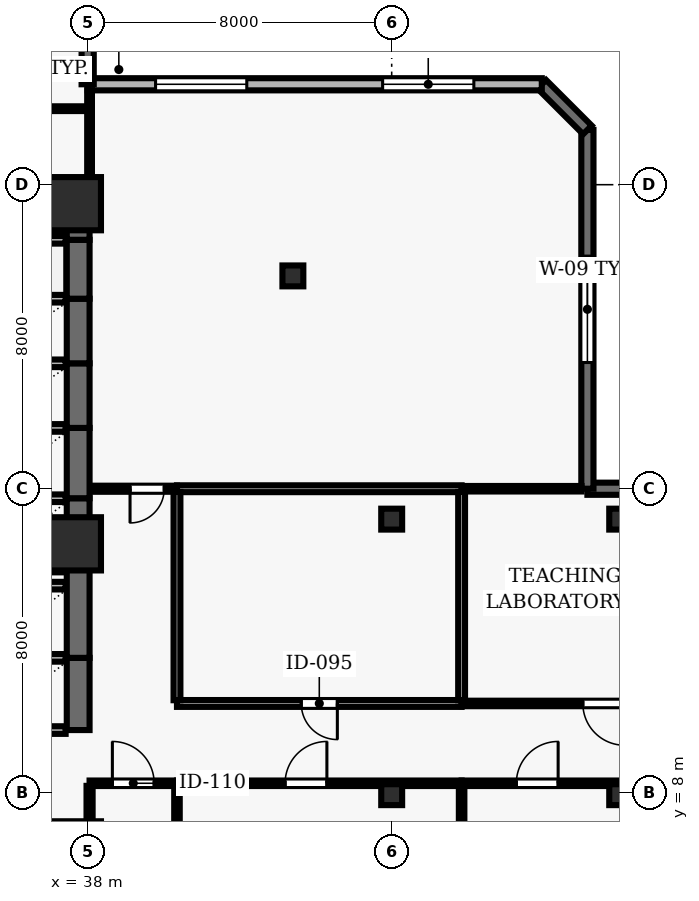
"""IFC4 building model, lengths in metres.
Left out: names, types, materials, properties, quantities, classifications, styles, units other than length and angle.
Written with IfcOpenShell. Run it as: python <this file> out.ifc"""

import sys

from ifc_helpers import new_model, si_unit, direction, frame, frame_2d, origin, origin_2d, place, context, subcontext, project, spatial, rectangle, hollow_rectangle, extrude, element, fill, save


model = new_model("IFC4")
c1 = context("Model", 3, precision=1e-05, world=origin(), true_north=direction((0.0, 1.0)))
c2 = subcontext(c1, "Body", "Model", "MODEL_VIEW")
j1 = project(units=[si_unit("LENGTHUNIT", "METRE"), si_unit("PLANEANGLEUNIT", "RADIAN")], contexts=[c1])
p1 = place(None, origin())
s1 = spatial("IfcSite", under=j1, at=p1, CompositionType="ELEMENT")
p2 = place(p1, origin())
s2 = spatial("IfcBuilding", under=s1, at=p2, CompositionType="ELEMENT")
p3 = place(p2, frame((0.0, 0.0, 66.1)))
s3 = spatial("IfcBuildingStorey", under=s2, at=p3, CompositionType="ELEMENT", Elevation=66.1)
for number, where, z_axis, x_axis in (
    (1, (37.65, 14.55, 0.0), (0.0, 0.0, 1.0), (1.0, 0.0, 0.0)),
    (2, (37.65, 23.5, 0.0), (0.0, 0.0, 1.0), (1.0, 0.0, 0.0)),
):
    element("IfcColumn", number, at=place(p3, frame(where, z_axis=z_axis, x_axis=x_axis)), inside=s3, PredefinedType="COLUMN", context=c2, shape_type="SweptSolid", body=[
        extrude(rectangle(XDim=1.4, YDim=1.4, at=origin_2d()), origin(), (0.0, 0.0, 1.0), 3.9),
    ])
for number, where, z_axis, x_axis in (
    (3, (46.0, 7.95, 0.0), (0.0, 0.0, 1.0), (1.0, 0.0, 0.0)),
    (4, (46.0, 15.2, 0.0), (0.0, 0.0, 1.0), (1.0, 0.0, 0.0)),
    (5, (52.0, 7.95, 0.0), (0.0, 0.0, 1.0), (1.0, 0.0, 0.0)),
    (6, (52.0, 15.2, 0.0), (0.0, 0.0, 1.0), (1.0, 0.0, 0.0)),
    (7, (43.4, 21.6, 0.0), (0.0, 0.0, 1.0), (1.0, 0.0, 0.0)),
):
    element("IfcColumn", number, at=place(p3, frame(where, z_axis=z_axis, x_axis=x_axis)), inside=s3, PredefinedType="COLUMN", context=c2, shape_type="SweptSolid", body=[
        extrude(hollow_rectangle(XDim=0.55, YDim=0.55, WallThickness=0.025, at=origin_2d()), origin(), (0.0, 0.0, 1.0), 3.9),
    ])
p4 = place(p3, frame((73.5, 16.0, 0.0), z_axis=(0.0, 0.0, 1.0), x_axis=(-1.0, 0.0, 0.0)))
e8 = element("IfcWall", 8, at=p4, inside=s3, PredefinedType="SOLIDWALL", context=c2, shape_type="SweptSolid", body=[
    extrude(rectangle(XDim=22.35, YDim=0.32, at=frame_2d((11.175, 0.0))), origin(), (0.0, 0.0, 1.0), 3.69),
])
p5 = place(p4, frame((12.775, 0.0, 0.0)))
e9 = element("IfcOpeningElement", 9, at=p5, cuts=e8, PredefinedType="OPENING", context=c2, shape_type="SweptSolid", body=[
    extrude(rectangle(XDim=1.0, YDim=2.2, at=frame_2d((0.5, 1.1))), frame((0.0, 0.17, 0.0), z_axis=(0.0, -1.0, 0.0), x_axis=(1.0, 0.0, 0.0)), (0.0, 0.0, 1.0), 0.34),
])
p6 = place(p4, frame((0.694, 0.0, 0.9)))
e10 = element("IfcOpeningElement", 10, at=p6, cuts=e8, PredefinedType="OPENING", context=c2, shape_type="SweptSolid", body=[
    extrude(rectangle(XDim=2.4, YDim=1.8, at=frame_2d((1.2, 0.9))), frame((0.0, 0.17, 0.0), z_axis=(0.0, -1.0, 0.0), x_axis=(1.0, 0.0, 0.0)), (0.0, 0.0, 1.0), 0.34),
])
p7 = place(p4, frame((7.181, 0.0, 0.9)))
e11 = element("IfcOpeningElement", 11, at=p7, cuts=e8, PredefinedType="OPENING", context=c2, shape_type="SweptSolid", body=[
    extrude(rectangle(XDim=2.4, YDim=1.8, at=frame_2d((1.2, 0.9))), frame((0.0, 0.17, 0.0), z_axis=(0.0, -1.0, 0.0), x_axis=(1.0, 0.0, 0.0)), (0.0, 0.0, 1.0), 0.34),
])
p8 = place(p3, frame((51.15, 16.0, 0.0), z_axis=(0.0, 0.0, 1.0), x_axis=(0.0, 1.0, 0.0)))
e12 = element("IfcWall", 12, at=p8, inside=s3, PredefinedType="SOLIDWALL", context=c2, shape_type="SweptSolid", body=[
    extrude(rectangle(XDim=9.442, YDim=0.32, at=frame_2d((4.721, 0.0))), origin(), (0.0, 0.0, 1.0), 3.69),
])
p9 = place(p8, frame((3.321, 0.0, 0.9)))
e13 = element("IfcOpeningElement", 13, at=p9, cuts=e12, PredefinedType="OPENING", context=c2, shape_type="SweptSolid", body=[
    extrude(rectangle(XDim=2.8, YDim=1.8, at=frame_2d((1.4, 0.9))), frame((0.0, 0.17, 0.0), z_axis=(0.0, -1.0, 0.0), x_axis=(1.0, 0.0, 0.0)), (0.0, 0.0, 1.0), 0.34),
])
p10 = place(p3, frame((51.15, 25.442, 0.0), z_axis=(0.0, 0.0, 1.0), x_axis=(-0.707034851297, 0.707178703759, 0.0)))
e14 = element("IfcWall", 14, at=p10, inside=s3, PredefinedType="SOLIDWALL", context=c2, shape_type="SweptSolid", body=[
    extrude(rectangle(XDim=1.697, YDim=0.32, at=frame_2d((0.849, 0.0))), origin(), (0.0, 0.0, 1.0), 3.69),
])
p11 = place(p3, frame((49.95, 26.642, 0.0), z_axis=(0.0, 0.0, 1.0), x_axis=(-1.0, 0.0, 0.0)))
e15 = element("IfcWall", 15, at=p11, inside=s3, PredefinedType="SOLIDWALL", context=c2, shape_type="SweptSolid", body=[
    extrude(rectangle(XDim=11.95, YDim=0.32, at=frame_2d((5.975, 0.0))), origin(), (0.0, 0.0, 1.0), 3.69),
])
p12 = place(p11, frame((1.788, 0.0, 0.9)))
e16 = element("IfcOpeningElement", 16, at=p12, cuts=e15, PredefinedType="OPENING", context=c2, shape_type="SweptSolid", body=[
    extrude(rectangle(XDim=2.4, YDim=2.2, at=frame_2d((1.2, 1.1))), frame((0.0, 0.17, 0.0), z_axis=(0.0, -1.0, 0.0), x_axis=(1.0, 0.0, 0.0)), (0.0, 0.0, 1.0), 0.34),
])
p13 = place(p11, frame((7.763, 0.0, 0.9)))
e17 = element("IfcOpeningElement", 17, at=p13, cuts=e15, PredefinedType="OPENING", context=c2, shape_type="SweptSolid", body=[
    extrude(rectangle(XDim=2.4, YDim=2.2, at=frame_2d((1.2, 1.1))), frame((0.0, 0.17, 0.0), z_axis=(0.0, -1.0, 0.0), x_axis=(1.0, 0.0, 0.0)), (0.0, 0.0, 1.0), 0.34),
])
p14 = place(p3, frame((38.0, 26.642, 0.0), z_axis=(0.0, 0.0, 1.0), x_axis=(0.0, 1.0, 0.0)))
e18 = element("IfcWall", 18, at=p14, inside=s3, PredefinedType="SOLIDWALL", context=c2, shape_type="SweptSolid", body=[
    extrude(rectangle(XDim=24.858, YDim=0.32, at=frame_2d((12.429, 0.0))), origin(), (0.0, 0.0, 1.0), 3.69),
])
p15 = place(p14, frame((12.029, 0.0, 0.0)))
e19 = element("IfcOpeningElement", 19, at=p15, cuts=e18, PredefinedType="OPENING", context=c2, shape_type="SweptSolid", body=[
    extrude(rectangle(XDim=1.0, YDim=2.2, at=frame_2d((0.5, 1.1))), frame((0.0, 0.17, 0.0), z_axis=(0.0, -1.0, 0.0), x_axis=(1.0, 0.0, 0.0)), (0.0, 0.0, 1.0), 0.34),
])
p16 = place(p14, frame((20.701, 0.0, 0.9)))
e20 = element("IfcOpeningElement", 20, at=p16, cuts=e18, PredefinedType="OPENING", context=c2, shape_type="SweptSolid", body=[
    extrude(rectangle(XDim=3.0, YDim=2.2, at=frame_2d((1.5, 1.1))), frame((0.0, 0.17, 0.0), z_axis=(0.0, -1.0, 0.0), x_axis=(1.0, 0.0, 0.0)), (0.0, 0.0, 1.0), 0.34),
])
p17 = place(p3, frame((37.75, 9.65, 0.0), z_axis=(0.0, 0.0, 1.0), x_axis=(0.0, 1.0, 0.0)))
e21 = element("IfcWall", 21, at=p17, inside=s3, PredefinedType="SHEAR", context=c2, shape_type="SweptSolid", body=[
    extrude(rectangle(XDim=1.9, YDim=0.6, at=frame_2d((0.95, 0.0))), origin(), (0.0, 0.0, 1.0), 3.69),
])
for number, where, z_axis, x_axis in (
    (22, (35.28, 9.65, 0.0), (0.0, 0.0, 1.0), (1.0, 0.0, 0.0)),
    (23, (37.42, 11.55, 0.0), (0.0, 0.0, 1.0), (-1.0, 0.0, 0.0)),
):
    element("IfcWall", number, at=place(p3, frame(where, z_axis=z_axis, x_axis=x_axis)), inside=s3, PredefinedType="SOLIDWALL", context=c2, shape_type="SweptSolid", body=[
        extrude(rectangle(XDim=2.14, YDim=0.2, at=frame_2d((1.07, 0.0))), origin(), (0.0, 0.0, 1.0), 3.69),
    ])
p18 = place(p3, frame((37.75, 11.55, 0.0), z_axis=(0.0, 0.0, 1.0), x_axis=(0.0, 1.0, 0.0)))
e24 = element("IfcWall", 24, at=p18, inside=s3, PredefinedType="SHEAR", context=c2, shape_type="SweptSolid", body=[
    extrude(rectangle(XDim=2.35, YDim=0.6, at=frame_2d((1.175, 0.0))), origin(), (0.0, 0.0, 1.0), 3.69),
])
p19 = place(p3, frame((37.42, 13.45, 0.0), z_axis=(0.0, 0.0, 1.0), x_axis=(-1.0, 0.0, 0.0)))
e25 = element("IfcWall", 25, at=p19, inside=s3, PredefinedType="SOLIDWALL", context=c2, shape_type="SweptSolid", body=[
    extrude(rectangle(XDim=2.14, YDim=0.2, at=frame_2d((1.07, 0.0))), origin(), (0.0, 0.0, 1.0), 3.69),
])
p20 = place(p3, frame((37.75, 13.9, 0.0), z_axis=(0.0, 0.0, 1.0), x_axis=(0.0, 1.0, 0.0)))
e26 = element("IfcWall", 26, at=p20, inside=s3, PredefinedType="SHEAR", context=c2, shape_type="SweptSolid", body=[
    extrude(rectangle(XDim=1.85, YDim=0.6, at=frame_2d((0.925, 0.0))), origin(), (0.0, 0.0, 1.0), 3.69),
])
for number, where, z_axis, x_axis in (
    (27, (35.28, 13.9, 0.0), (0.0, 0.0, 1.0), (1.0, 0.0, 0.0)),
    (28, (37.42, 15.75, 0.0), (0.0, 0.0, 1.0), (-1.0, 0.0, 0.0)),
):
    element("IfcWall", number, at=place(p3, frame(where, z_axis=z_axis, x_axis=x_axis)), inside=s3, PredefinedType="SOLIDWALL", context=c2, shape_type="SweptSolid", body=[
        extrude(rectangle(XDim=2.14, YDim=0.2, at=frame_2d((1.07, 0.0))), origin(), (0.0, 0.0, 1.0), 3.69),
    ])
p21 = place(p3, frame((37.75, 15.75, 0.0), z_axis=(0.0, 0.0, 1.0), x_axis=(0.0, 1.0, 0.0)))
e29 = element("IfcWall", 29, at=p21, inside=s3, PredefinedType="SHEAR", context=c2, shape_type="SweptSolid", body=[
    extrude(rectangle(XDim=1.85, YDim=0.6, at=frame_2d((0.925, 0.0))), origin(), (0.0, 0.0, 1.0), 3.69),
])
p22 = place(p3, frame((37.42, 17.6, 0.0), z_axis=(0.0, 0.0, 1.0), x_axis=(-1.0, 0.0, 0.0)))
e30 = element("IfcWall", 30, at=p22, inside=s3, PredefinedType="SOLIDWALL", context=c2, shape_type="SweptSolid", body=[
    extrude(rectangle(XDim=2.14, YDim=0.2, at=frame_2d((1.07, 0.0))), origin(), (0.0, 0.0, 1.0), 3.69),
])
p23 = place(p3, frame((37.75, 17.6, 0.0), z_axis=(0.0, 0.0, 1.0), x_axis=(0.0, 1.0, 0.0)))
e31 = element("IfcWall", 31, at=p23, inside=s3, PredefinedType="SHEAR", context=c2, shape_type="SweptSolid", body=[
    extrude(rectangle(XDim=1.7, YDim=0.6, at=frame_2d((0.85, 0.0))), origin(), (0.0, 0.0, 1.0), 3.69),
])
p24 = place(p3, frame((37.42, 19.3, 0.0), z_axis=(0.0, 0.0, 1.0), x_axis=(-1.0, 0.0, 0.0)))
e32 = element("IfcWall", 32, at=p24, inside=s3, PredefinedType="SOLIDWALL", context=c2, shape_type="SweptSolid", body=[
    extrude(rectangle(XDim=2.14, YDim=0.2, at=frame_2d((1.07, 0.0))), origin(), (0.0, 0.0, 1.0), 3.69),
])
p25 = place(p3, frame((37.75, 19.3, 0.0), z_axis=(0.0, 0.0, 1.0), x_axis=(0.0, 1.0, 0.0)))
e33 = element("IfcWall", 33, at=p25, inside=s3, PredefinedType="SHEAR", context=c2, shape_type="SweptSolid", body=[
    extrude(rectangle(XDim=1.7, YDim=0.6, at=frame_2d((0.85, 0.0))), origin(), (0.0, 0.0, 1.0), 3.69),
])
p26 = place(p3, frame((37.42, 21.0, 0.0), z_axis=(0.0, 0.0, 1.0), x_axis=(-1.0, 0.0, 0.0)))
e34 = element("IfcWall", 34, at=p26, inside=s3, PredefinedType="SOLIDWALL", context=c2, shape_type="SweptSolid", body=[
    extrude(rectangle(XDim=2.14, YDim=0.2, at=frame_2d((1.07, 0.0))), origin(), (0.0, 0.0, 1.0), 3.69),
])
p27 = place(p3, frame((37.75, 21.0, 0.0), z_axis=(0.0, 0.0, 1.0), x_axis=(0.0, 1.0, 0.0)))
e35 = element("IfcWall", 35, at=p27, inside=s3, PredefinedType="SHEAR", context=c2, shape_type="SweptSolid", body=[
    extrude(rectangle(XDim=1.55, YDim=0.6, at=frame_2d((0.775, 0.0))), origin(), (0.0, 0.0, 1.0), 3.69),
])
p28 = place(p3, frame((37.42, 22.55, 0.0), z_axis=(0.0, 0.0, 1.0), x_axis=(-1.0, 0.0, 0.0)))
e36 = element("IfcWall", 36, at=p28, inside=s3, PredefinedType="SOLIDWALL", context=c2, shape_type="SweptSolid", body=[
    extrude(rectangle(XDim=2.14, YDim=0.2, at=frame_2d((1.07, 0.0))), origin(), (0.0, 0.0, 1.0), 3.69),
])
p29 = place(p3, frame((37.75, 22.55, 0.0), z_axis=(0.0, 0.0, 1.0), x_axis=(0.0, 1.0, 0.0)))
e37 = element("IfcWall", 37, at=p29, inside=s3, PredefinedType="SHEAR", context=c2, shape_type="SweptSolid", body=[
    extrude(rectangle(XDim=1.5, YDim=0.6, at=frame_2d((0.75, 0.0))), origin(), (0.0, 0.0, 1.0), 3.69),
])
p30 = place(p3, frame((37.42, 24.05, 0.0), z_axis=(0.0, 0.0, 1.0), x_axis=(-1.0, 0.0, 0.0)))
e38 = element("IfcWall", 38, at=p30, inside=s3, PredefinedType="SOLIDWALL", context=c2, shape_type="SweptSolid", body=[
    extrude(rectangle(XDim=2.14, YDim=0.2, at=frame_2d((1.07, 0.0))), origin(), (0.0, 0.0, 1.0), 3.69),
])
p31 = place(p3, frame((35.15, 26.0, 0.0), z_axis=(0.0, 0.0, 1.0), x_axis=(1.0, 0.0, 0.0)))
e39 = element("IfcWall", 39, at=p31, inside=s3, PredefinedType="PARTITIONING", context=c2, shape_type="SweptSolid", body=[
    extrude(rectangle(XDim=2.7, YDim=0.125, at=frame_2d((1.35, 0.0))), origin(), (0.0, 0.0, 1.0), 3.69),
])
p32 = place(p3, frame((38.05, 8.25, 0.0), z_axis=(0.0, 0.0, 1.0), x_axis=(1.0, 0.0, 0.0)))
e40 = element("IfcWall", 40, at=p32, inside=s3, PredefinedType="PARTITIONING", context=c2, shape_type="SweptSolid", body=[
    extrude(rectangle(XDim=2.3, YDim=0.145, at=frame_2d((1.15, 0.0))), origin(), (0.0, 0.0, 1.0), 3.055),
])
p33 = place(p32, frame((0.6, 0.0, 0.0)))
e41 = element("IfcOpeningElement", 41, at=p33, cuts=e40, PredefinedType="OPENING", context=c2, shape_type="SweptSolid", body=[
    extrude(rectangle(XDim=1.1, YDim=2.15, at=frame_2d((0.55, 1.075))), frame((0.0, 0.083, 0.0), z_axis=(0.0, -1.0, 0.0), x_axis=(1.0, 0.0, 0.0)), (0.0, 0.0, 1.0), 0.165),
])
p34 = place(p3, frame((40.35, 8.25, 0.0), z_axis=(0.0, 0.0, 1.0), x_axis=(1.0, 0.0, 0.0)))
e42 = element("IfcWall", 42, at=p34, inside=s3, PredefinedType="PARTITIONING", context=c2, shape_type="SweptSolid", body=[
    extrude(rectangle(XDim=7.49, YDim=0.145, at=frame_2d((3.745, 0.0))), origin(), (0.0, 0.0, 1.0), 3.055),
])
p35 = place(p34, frame((2.845, 0.0, 0.0)))
e43 = element("IfcOpeningElement", 43, at=p35, cuts=e42, PredefinedType="OPENING", context=c2, shape_type="SweptSolid", body=[
    extrude(rectangle(XDim=1.1, YDim=2.15, at=frame_2d((0.55, 1.075))), frame((0.0, 0.083, 0.0), z_axis=(0.0, -1.0, 0.0), x_axis=(1.0, 0.0, 0.0)), (0.0, 0.0, 1.0), 0.165),
])
p36 = place(p3, frame((40.35, 16.0, 0.0), z_axis=(0.0, 0.0, 1.0), x_axis=(-1.0, 0.0, 0.0)))
e44 = element("IfcWall", 44, at=p36, inside=s3, PredefinedType="PARTITIONING", context=c2, shape_type="SweptSolid", body=[
    extrude(rectangle(XDim=2.27, YDim=0.16, at=frame_2d((1.135, 0.0))), origin(), (0.0, 0.0, 1.0), 3.69),
])
p37 = place(p36, frame((0.335, 0.0, 0.0)))
e45 = element("IfcOpeningElement", 45, at=p37, cuts=e44, PredefinedType="OPENING", context=c2, shape_type="SweptSolid", body=[
    extrude(rectangle(XDim=0.9, YDim=2.1, at=frame_2d((0.45, 1.05))), frame((0.0, 0.09, 0.0), z_axis=(0.0, -1.0, 0.0), x_axis=(1.0, 0.0, 0.0)), (0.0, 0.0, 1.0), 0.18),
])
p38 = place(p3, frame((47.84, 8.25, 0.0), z_axis=(0.0, 0.0, 1.0), x_axis=(1.0, 0.0, 0.0)))
e46 = element("IfcWall", 46, at=p38, inside=s3, PredefinedType="PARTITIONING", context=c2, shape_type="SweptSolid", body=[
    extrude(rectangle(XDim=7.48, YDim=0.145, at=frame_2d((3.74, 0.0))), origin(), (0.0, 0.0, 1.0), 3.055),
])
p39 = place(p38, frame((1.44, 0.0, 0.0)))
e47 = element("IfcOpeningElement", 47, at=p39, cuts=e46, PredefinedType="OPENING", context=c2, shape_type="SweptSolid", body=[
    extrude(rectangle(XDim=1.1, YDim=2.15, at=frame_2d((0.55, 1.075))), frame((0.0, 0.083, 0.0), z_axis=(0.0, -1.0, 0.0), x_axis=(1.0, 0.0, 0.0)), (0.0, 0.0, 1.0), 0.165),
])
p40 = place(p3, frame((47.84, 10.35, 0.0), z_axis=(0.0, 0.0, 1.0), x_axis=(-1.0, 0.0, 0.0)))
e48 = element("IfcWall", 48, at=p40, inside=s3, PredefinedType="PARTITIONING", context=c2, shape_type="SweptSolid", body=[
    extrude(rectangle(XDim=7.49, YDim=0.18, at=frame_2d((3.745, 0.0))), origin(), (0.0, 0.0, 1.0), 3.277),
])
p41 = place(p40, frame((3.27, 0.0, 0.0)))
e49 = element("IfcOpeningElement", 49, at=p41, cuts=e48, PredefinedType="OPENING", context=c2, shape_type="SweptSolid", body=[
    extrude(rectangle(XDim=0.95, YDim=2.1, at=frame_2d((0.475, 1.05))), frame((0.0, 0.1, 0.0), z_axis=(0.0, -1.0, 0.0), x_axis=(1.0, 0.0, 0.0)), (0.0, 0.0, 1.0), 0.2),
])
p42 = place(p3, frame((47.84, 16.0, 0.0), z_axis=(0.0, 0.0, 1.0), x_axis=(1.0, 0.0, 0.0)))
e50 = element("IfcWall", 50, at=p42, inside=s3, PredefinedType="PARTITIONING", context=c2, shape_type="SweptSolid", body=[
    extrude(rectangle(XDim=3.155, YDim=0.145, at=frame_2d((1.578, 0.0))), origin(), (0.0, 0.0, 1.0), 3.39),
])
p43 = place(p3, frame((47.84, 16.0, 0.0), z_axis=(0.0, 0.0, 1.0), x_axis=(-1.0, 0.0, 0.0)))
e51 = element("IfcWall", 51, at=p43, inside=s3, PredefinedType="PARTITIONING", context=c2, shape_type="SweptSolid", body=[
    extrude(rectangle(XDim=7.49, YDim=0.18, at=frame_2d((3.745, 0.0))), origin(), (0.0, 0.0, 1.0), 3.39),
])
p44 = place(p3, frame((55.32, 10.35, 0.0), z_axis=(0.0, 0.0, 1.0), x_axis=(-1.0, 0.0, 0.0)))
e52 = element("IfcWall", 52, at=p44, inside=s3, PredefinedType="PARTITIONING", context=c2, shape_type="SweptSolid", body=[
    extrude(rectangle(XDim=7.48, YDim=0.145, at=frame_2d((3.74, 0.0))), origin(), (0.0, 0.0, 1.0), 3.277),
])
p45 = place(p44, frame((3.19, 0.0, 0.0)))
e53 = element("IfcOpeningElement", 53, at=p45, cuts=e52, PredefinedType="OPENING", context=c2, shape_type="SweptSolid", body=[
    extrude(rectangle(XDim=1.1, YDim=2.15, at=frame_2d((0.55, 1.075))), frame((0.0, 0.083, 0.0), z_axis=(0.0, -1.0, 0.0), x_axis=(1.0, 0.0, 0.0)), (0.0, 0.0, 1.0), 0.165),
])
p46 = place(p3, frame((38.05, 7.05, 0.0), z_axis=(0.0, 0.0, 1.0), x_axis=(0.0, 1.0, 0.0)))
e54 = element("IfcWall", 54, at=p46, inside=s3, PredefinedType="PARTITIONING", context=c2, shape_type="SweptSolid", body=[
    extrude(rectangle(XDim=1.132, YDim=0.16, at=frame_2d((0.566, 0.0))), origin(), (0.0, 0.0, 1.0), 3.055),
])
p47 = place(p3, frame((38.05, 26.487, 0.0), z_axis=(0.0, 0.0, 1.0), x_axis=(0.0, -1.0, 0.0)))
e55 = element("IfcWall", 55, at=p47, inside=s3, PredefinedType="PARTITIONING", context=c2, shape_type="SweptSolid", body=[
    extrude(rectangle(XDim=2.437, YDim=0.125, at=frame_2d((1.219, 0.0))), origin(), (0.0, 0.0, 1.0), 3.055),
])
p48 = place(p3, frame((40.35, 0.155, 0.0), z_axis=(0.0, 0.0, 1.0), x_axis=(0.0, 1.0, 0.0)))
e56 = element("IfcWall", 56, at=p48, inside=s3, PredefinedType="PARTITIONING", context=c2, shape_type="SweptSolid", body=[
    extrude(rectangle(XDim=8.027, YDim=0.145, at=frame_2d((4.013, 0.0))), origin(), (0.0, 0.0, 1.0), 3.69),
])
p49 = place(p3, frame((40.35, 10.435, 0.0), z_axis=(0.0, 0.0, 1.0), x_axis=(0.0, 1.0, 0.0)))
e57 = element("IfcWall", 57, at=p49, inside=s3, PredefinedType="PARTITIONING", context=c2, shape_type="SweptSolid", body=[
    extrude(rectangle(XDim=5.48, YDim=0.18, at=frame_2d((2.74, 0.0))), origin(), (0.0, 0.0, 1.0), 3.277),
])
p50 = place(p3, frame((47.84, 0.155, 0.0), z_axis=(0.0, 0.0, 1.0), x_axis=(0.0, 1.0, 0.0)))
e58 = element("IfcWall", 58, at=p50, inside=s3, PredefinedType="PARTITIONING", context=c2, shape_type="SweptSolid", body=[
    extrude(rectangle(XDim=8.027, YDim=0.145, at=frame_2d((4.013, 0.0))), origin(), (0.0, 0.0, 1.0), 3.69),
])
p51 = place(p3, frame((47.84, 10.435, 0.0), z_axis=(0.0, 0.0, 1.0), x_axis=(0.0, 1.0, 0.0)))
e59 = element("IfcWall", 59, at=p51, inside=s3, PredefinedType="PARTITIONING", context=c2, shape_type="SweptSolid", body=[
    extrude(rectangle(XDim=5.48, YDim=0.18, at=frame_2d((2.74, 0.0))), origin(), (0.0, 0.0, 1.0), 3.69),
])
p52 = place(p9, origin())
e60 = element("IfcWindow", 60, at=p52, inside=s3, PartitioningType="SINGLE_PANEL", PredefinedType="WINDOW", context=c2, shape_type="SweptSolid", body=[
    extrude(rectangle(XDim=2.8, YDim=1.8, at=frame_2d((1.4, 0.9))), frame((0.0, 0.03, 0.0), z_axis=(0.0, -1.0, 0.0), x_axis=(1.0, 0.0, 0.0)), (0.0, 0.0, 1.0), 0.06),
])
fill(e13, e60)
p53 = place(p12, origin())
e61 = element("IfcWindow", 61, at=p53, inside=s3, PartitioningType="SINGLE_PANEL", PredefinedType="WINDOW", context=c2, shape_type="SweptSolid", body=[
    extrude(rectangle(XDim=2.4, YDim=2.2, at=frame_2d((1.2, 1.1))), frame((0.0, 0.03, 0.0), z_axis=(0.0, -1.0, 0.0), x_axis=(1.0, 0.0, 0.0)), (0.0, 0.0, 1.0), 0.06),
])
fill(e16, e61)
p54 = place(p13, origin())
e62 = element("IfcWindow", 62, at=p54, inside=s3, PartitioningType="SINGLE_PANEL", PredefinedType="WINDOW", context=c2, shape_type="SweptSolid", body=[
    extrude(rectangle(XDim=2.4, YDim=2.2, at=frame_2d((1.2, 1.1))), frame((0.0, 0.03, 0.0), z_axis=(0.0, -1.0, 0.0), x_axis=(1.0, 0.0, 0.0)), (0.0, 0.0, 1.0), 0.06),
])
fill(e17, e62)
p55 = place(p33, origin())
e63 = element("IfcDoor", 63, at=p55, inside=s3, OperationType="SINGLE_SWING_LEFT", PredefinedType="DOOR", context=c2, shape_type="SweptSolid", body=[
    extrude(rectangle(XDim=1.1, YDim=2.15, at=frame_2d((0.55, 1.075))), frame((0.0, 0.025, 0.0), z_axis=(0.0, -1.0, 0.0), x_axis=(1.0, 0.0, 0.0)), (0.0, 0.0, 1.0), 0.05),
])
fill(e41, e63)
p56 = place(p35, origin())
e64 = element("IfcDoor", 64, at=p56, inside=s3, OperationType="SINGLE_SWING_RIGHT", PredefinedType="DOOR", context=c2, shape_type="SweptSolid", body=[
    extrude(rectangle(XDim=1.1, YDim=2.15, at=frame_2d((0.55, 1.075))), frame((0.0, 0.025, 0.0), z_axis=(0.0, -1.0, 0.0), x_axis=(1.0, 0.0, 0.0)), (0.0, 0.0, 1.0), 0.05),
])
fill(e43, e64)
p57 = place(p41, origin())
e65 = element("IfcDoor", 65, at=p57, inside=s3, OperationType="SINGLE_SWING_LEFT", PredefinedType="DOOR", context=c2, shape_type="SweptSolid", body=[
    extrude(rectangle(XDim=0.95, YDim=2.1, at=frame_2d((0.475, 1.05))), frame((0.0, 0.025, 0.0), z_axis=(0.0, -1.0, 0.0), x_axis=(1.0, 0.0, 0.0)), (0.0, 0.0, 1.0), 0.05),
])
fill(e49, e65)
p58 = place(p39, origin())
e66 = element("IfcDoor", 66, at=p58, inside=s3, OperationType="SINGLE_SWING_RIGHT", PredefinedType="DOOR", context=c2, shape_type="SweptSolid", body=[
    extrude(rectangle(XDim=1.1, YDim=2.15, at=frame_2d((0.55, 1.075))), frame((0.0, 0.025, 0.0), z_axis=(0.0, -1.0, 0.0), x_axis=(1.0, 0.0, 0.0)), (0.0, 0.0, 1.0), 0.05),
])
fill(e47, e66)
p59 = place(p45, origin())
e67 = element("IfcDoor", 67, at=p59, inside=s3, OperationType="SINGLE_SWING_LEFT", PredefinedType="DOOR", context=c2, shape_type="SweptSolid", body=[
    extrude(rectangle(XDim=1.1, YDim=2.15, at=frame_2d((0.55, 1.075))), frame((0.0, 0.025, 0.0), z_axis=(0.0, -1.0, 0.0), x_axis=(1.0, 0.0, 0.0)), (0.0, 0.0, 1.0), 0.05),
])
fill(e53, e67)
p60 = place(p37, origin())
e68 = element("IfcDoor", 68, at=p60, inside=s3, OperationType="SINGLE_SWING_RIGHT", PredefinedType="DOOR", context=c2, shape_type="SweptSolid", body=[
    extrude(rectangle(XDim=0.9, YDim=2.1, at=frame_2d((0.45, 1.05))), frame((0.0, 0.025, 0.0), z_axis=(0.0, -1.0, 0.0), x_axis=(1.0, 0.0, 0.0)), (0.0, 0.0, 1.0), 0.05),
])
fill(e45, e68)
save(model, sys.argv[1])
